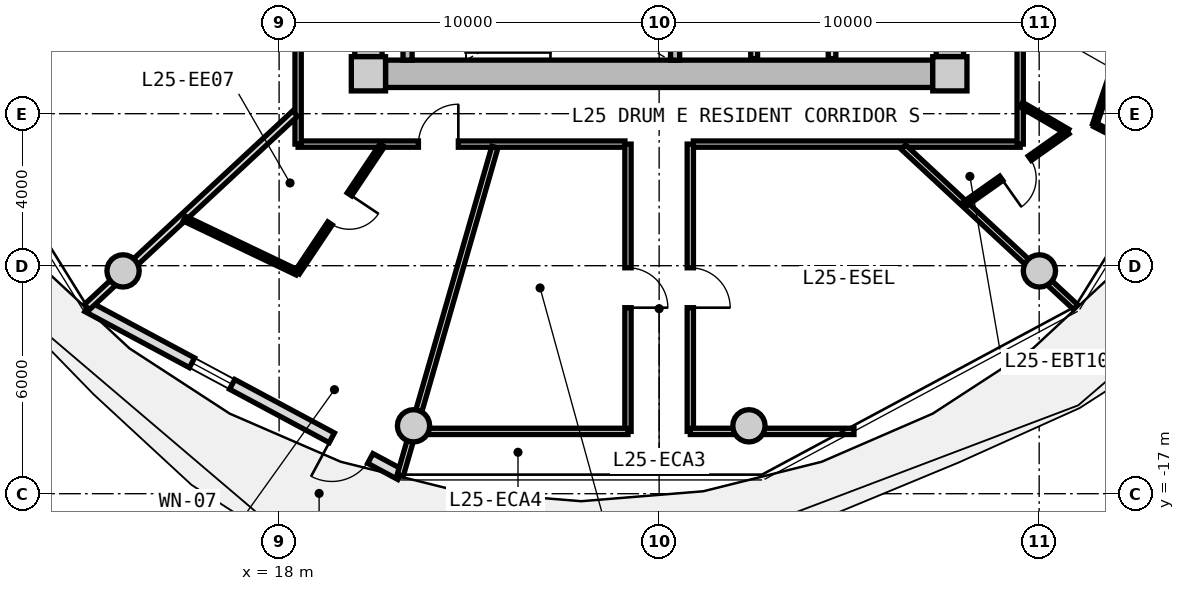
"""IFC4 building model, lengths in metres.
Left out: names, types, materials, properties, quantities, classifications, styles, units other than length and angle.
Written with IfcOpenShell. Run it as: python <this file> out.ifc"""

import sys

from ifc_helpers import new_model, si_unit, direction, frame, frame_2d, origin, origin_2d, place, context, subcontext, project, spatial, rectangle, circle, extrude, source, transform, mapped, element, fill, save


model = new_model("IFC4")
c1 = context("Model", 3, precision=1e-05, world=origin(), true_north=direction((0.0, 1.0)))
c2 = subcontext(c1, "Body", "Model", "MODEL_VIEW")
j1 = project(units=[si_unit("LENGTHUNIT", "METRE"), si_unit("PLANEANGLEUNIT", "RADIAN")], contexts=[c1])
p1 = place(None, origin())
s1 = spatial("IfcSite", under=j1, at=p1, CompositionType="ELEMENT")
p2 = place(p1, origin())
s2 = spatial("IfcBuilding", under=s1, at=p2, CompositionType="ELEMENT")
p3 = place(p2, frame((0.0, 0.0, 84.05)))
s3 = spatial("IfcBuildingStorey", under=s2, at=p3, CompositionType="ELEMENT", Elevation=84.05)
m1 = source(origin(), c2, "Body", "SweptSolid", [
    extrude(rectangle(XDim=0.9, YDim=0.9, at=origin_2d()), origin(), (0.0, 0.0, 1.0), 3.05),
])
for number, where, z_axis, x_axis in (
    (1, (20.35, -5.95, 0.0), (0.0, 0.0, 1.0), (1.0, 0.0, 0.0)),
    (2, (35.65, -5.95, 0.0), (0.0, 0.0, 1.0), (1.0, 0.0, 0.0)),
):
    element("IfcColumn", number, at=place(p3, frame(where, z_axis=z_axis, x_axis=x_axis)), inside=s3, PredefinedType="COLUMN", context=c2, shape_type="MappedRepresentation", body=[
        mapped(m1, transform((0.0, 0.0, 0.0), x_axis=(1.0, 0.0, 0.0), y_axis=(0.0, 1.0, 0.0), z_axis=(0.0, 0.0, 1.0), scale=1.0)),
    ])
m2 = source(origin(), c2, "Body", "SweptSolid", [
    extrude(rectangle(XDim=14.4, YDim=0.72, at=frame_2d((7.2, 0.0))), origin(), (0.0, 0.0, 1.0), 2.79),
])
p4 = place(p3, frame((35.2, -5.95, 0.0), z_axis=(0.0, 0.0, 1.0), x_axis=(-1.0, 0.0, 0.0)))
e3 = element("IfcWall", 3, at=p4, inside=s3, PredefinedType="SHEAR", context=c2, shape_type="MappedRepresentation", body=[
    mapped(m2, transform((0.0, 0.0, 0.0), x_axis=(1.0, 0.0, 0.0), y_axis=(0.0, 1.0, 0.0), z_axis=(0.0, 0.0, 1.0), scale=1.0)),
])
m3 = source(origin(), c2, "Body", "SweptSolid", [
    extrude(rectangle(XDim=11.0, YDim=0.72, at=frame_2d((5.5, 0.0))), origin(), (0.0, 0.0, 1.0), 2.79),
])
p5 = place(p3, frame((20.35, -5.5, 0.0), z_axis=(0.0, 0.0, 1.0), x_axis=(0.0, 1.0, 0.0)))
e4 = element("IfcWall", 4, at=p5, inside=s3, PredefinedType="SHEAR", context=c2, shape_type="MappedRepresentation", body=[
    mapped(m3, transform((0.0, 0.0, 0.0), x_axis=(1.0, 0.0, 0.0), y_axis=(0.0, 1.0, 0.0), z_axis=(0.0, 0.0, 1.0), scale=1.0)),
])
p6 = place(p5, frame((3.8, 0.0, 0.0)))
e5 = element("IfcOpeningElement", 5, at=p6, cuts=e4, PredefinedType="OPENING", context=c2, shape_type="SweptSolid", body=[
    extrude(rectangle(XDim=1.2, YDim=2.15, at=frame_2d((0.6, 1.075))), frame((0.0, 0.37, 0.0), z_axis=(0.0, -1.0, 0.0), x_axis=(1.0, 0.0, 0.0)), (0.0, 0.0, 1.0), 0.74),
])
p7 = place(p3, frame((35.65, 5.5, 0.0), z_axis=(0.0, 0.0, 1.0), x_axis=(0.0, -1.0, 0.0)))
e6 = element("IfcWall", 6, at=p7, inside=s3, PredefinedType="SHEAR", context=c2, shape_type="MappedRepresentation", body=[
    mapped(m3, transform((0.0, 0.0, 0.0), x_axis=(1.0, 0.0, 0.0), y_axis=(0.0, 1.0, 0.0), z_axis=(0.0, 0.0, 1.0), scale=1.0)),
])
p8 = place(p7, frame((5.65, 0.0, 0.0)))
e7 = element("IfcOpeningElement", 7, at=p8, cuts=e6, PredefinedType="OPENING", context=c2, shape_type="SweptSolid", body=[
    extrude(rectangle(XDim=1.2, YDim=2.15, at=frame_2d((0.6, 1.075))), frame((0.0, 0.37, 0.0), z_axis=(0.0, -1.0, 0.0), x_axis=(1.0, 0.0, 0.0)), (0.0, 0.0, 1.0), 0.74),
])
m4 = source(origin(), c2, "Body", "SweptSolid", [
    extrude(circle(Radius=0.425, at=origin_2d()), origin(), (0.0, 0.0, 1.0), 3.05),
])
for number, where, z_axis, x_axis in (
    (8, (13.894, -11.137, 0.0), (0.0, 0.0, 1.0), (1.0, 0.0, 0.0)),
    (9, (21.537, -15.213, 0.0), (0.0, 0.0, 1.0), (1.0, 0.0, 0.0)),
    (10, (30.363, -15.213, 0.0), (0.0, 0.0, 1.0), (1.0, 0.0, 0.0)),
    (11, (38.006, -11.137, 0.0), (0.0, 0.0, 1.0), (1.0, 0.0, 0.0)),
):
    element("IfcColumn", number, at=place(p3, frame(where, z_axis=z_axis, x_axis=x_axis)), inside=s3, PredefinedType="COLUMN", context=c2, shape_type="MappedRepresentation", body=[
        mapped(m4, transform((0.0, 0.0, 0.0), x_axis=(1.0, 0.0, 0.0), y_axis=(0.0, 1.0, 0.0), z_axis=(0.0, 0.0, 1.0), scale=1.0)),
    ])
m5 = source(origin(), c2, "Body", "SweptSolid", [
    extrude(rectangle(XDim=9.351, YDim=0.29, at=frame_2d((4.675, 0.0))), origin(), (0.0, 0.0, 1.0), 2.79),
])
p9 = place(p3, frame((21.193, -16.498, 0.0), z_axis=(0.0, 0.0, 1.0), x_axis=(-0.881184411073, 0.472772708267, 0.0)))
e12 = element("IfcWall", 12, at=p9, inside=s3, PredefinedType="SOLIDWALL", context=c2, shape_type="MappedRepresentation", body=[
    mapped(m5, transform((0.0, 0.0, 0.0), x_axis=(1.0, 0.0, 0.0), y_axis=(0.0, 1.0, 0.0), z_axis=(0.0, 0.0, 1.0), scale=1.0)),
])
p10 = place(p9, frame((0.9, 0.0, 0.0)))
e13 = element("IfcOpeningElement", 13, at=p10, cuts=e12, PredefinedType="OPENING", context=c2, shape_type="SweptSolid", body=[
    extrude(rectangle(XDim=1.15, YDim=2.25, at=frame_2d((0.575, 1.125))), frame((0.0, 0.155, 0.0), z_axis=(0.0, -1.0, 0.0), x_axis=(1.0, 0.0, 0.0)), (0.0, 0.0, 1.0), 0.31),
])
p11 = place(p9, frame((5.025, 0.0, 0.85)))
e14 = element("IfcOpeningElement", 14, at=p11, cuts=e12, PredefinedType="OPENING", context=c2, shape_type="SweptSolid", body=[
    extrude(rectangle(XDim=1.2, YDim=1.5, at=frame_2d((0.6, 0.75))), frame((0.0, 0.155, 0.0), z_axis=(0.0, -1.0, 0.0), x_axis=(1.0, 0.0, 0.0)), (0.0, 0.0, 1.0), 0.31),
])
m6 = source(origin(), c2, "Body", "SweptSolid", [
    extrude(rectangle(XDim=3.14, YDim=0.24, at=frame_2d((1.57, 0.0))), origin(), (0.0, 0.0, 1.0), 2.79),
])
for number, where, z_axis, x_axis in (
    (15, (21.38, -5.59, 0.0), (0.0, 0.0, 1.0), (0.0, 1.0, 0.0)),
    (16, (28.42, -5.59, 0.0), (0.0, 0.0, 1.0), (0.0, 1.0, 0.0)),
):
    element("IfcWall", number, at=place(p3, frame(where, z_axis=z_axis, x_axis=x_axis)), inside=s3, PredefinedType="PARTITIONING", context=c2, shape_type="MappedRepresentation", body=[
        mapped(m6, transform((0.0, 0.0, 0.0), x_axis=(1.0, 0.0, 0.0), y_axis=(0.0, 1.0, 0.0), z_axis=(0.0, 0.0, 1.0), scale=1.0)),
    ])
m7 = source(origin(), c2, "Body", "SweptSolid", [
    extrude(rectangle(XDim=3.8, YDim=0.2, at=frame_2d((1.9, 0.0))), origin(), (0.0, 0.0, 1.0), 2.775),
])
p12 = place(p3, frame((32.55, -5.55, 0.0), z_axis=(0.0, 0.0, 1.0), x_axis=(0.0, 1.0, 0.0)))
e17 = element("IfcWall", 17, at=p12, inside=s3, PredefinedType="PARTITIONING", context=c2, shape_type="MappedRepresentation", body=[
    mapped(m7, transform((0.0, 0.0, 0.0), x_axis=(1.0, 0.0, 0.0), y_axis=(0.0, 1.0, 0.0), z_axis=(0.0, 0.0, 1.0), scale=1.0)),
])
m8 = source(origin(), c2, "Body", "SweptSolid", [
    extrude(rectangle(XDim=3.22, YDim=0.18, at=frame_2d((1.61, 0.0))), origin(), (0.0, 0.0, 1.0), 2.775),
])
p13 = place(p3, frame((30.5, -5.55, 0.0), z_axis=(0.0, 0.0, 1.0), x_axis=(0.0, 1.0, 0.0)))
e18 = element("IfcWall", 18, at=p13, inside=s3, PredefinedType="PARTITIONING", context=c2, shape_type="MappedRepresentation", body=[
    mapped(m8, transform((0.0, 0.0, 0.0), x_axis=(1.0, 0.0, 0.0), y_axis=(0.0, 1.0, 0.0), z_axis=(0.0, 0.0, 1.0), scale=1.0)),
])
m9 = source(origin(), c2, "Body", "SweptSolid", [
    extrude(rectangle(XDim=8.6, YDim=0.165, at=frame_2d((4.3, 0.0))), origin(), (0.0, 0.0, 1.0), 2.775),
])
p14 = place(p3, frame((37.5, -7.8, 0.0), z_axis=(0.0, 0.0, 1.0), x_axis=(-1.0, 0.0, 0.0)))
e19 = element("IfcWall", 19, at=p14, inside=s3, PredefinedType="PARTITIONING", context=c2, shape_type="MappedRepresentation", body=[
    mapped(m9, transform((0.0, 0.0, 0.0), x_axis=(1.0, 0.0, 0.0), y_axis=(0.0, 1.0, 0.0), z_axis=(0.0, 0.0, 1.0), scale=1.0)),
])
p15 = place(p3, frame((27.1, -7.8, 0.0), z_axis=(0.0, 0.0, 1.0), x_axis=(-1.0, 0.0, 0.0)))
e20 = element("IfcWall", 20, at=p15, inside=s3, PredefinedType="PARTITIONING", context=c2, shape_type="MappedRepresentation", body=[
    mapped(m9, transform((0.0, 0.0, 0.0), x_axis=(1.0, 0.0, 0.0), y_axis=(0.0, 1.0, 0.0), z_axis=(0.0, 0.0, 1.0), scale=1.0)),
])
p16 = place(p15, frame((4.384, 0.0, 0.0)))
e21 = element("IfcOpeningElement", 21, at=p16, cuts=e20, PredefinedType="OPENING", context=c2, shape_type="SweptSolid", body=[
    extrude(rectangle(XDim=1.05, YDim=2.15, at=frame_2d((0.525, 1.075))), frame((0.0, 0.093, 0.0), z_axis=(0.0, -1.0, 0.0), x_axis=(1.0, 0.0, 0.0)), (0.0, 0.0, 1.0), 0.185),
])
m10 = source(origin(), c2, "Body", "SweptSolid", [
    extrude(rectangle(XDim=15.6, YDim=0.165, at=frame_2d((7.8, 0.0))), origin(), (0.0, 0.0, 1.0), 2.775),
])
p17 = place(p3, frame((18.5, -7.8, 0.0), z_axis=(0.0, 0.0, 1.0), x_axis=(0.0, 1.0, 0.0)))
e22 = element("IfcWall", 22, at=p17, inside=s3, PredefinedType="PARTITIONING", context=c2, shape_type="MappedRepresentation", body=[
    mapped(m10, transform((0.0, 0.0, 0.0), x_axis=(1.0, 0.0, 0.0), y_axis=(0.0, 1.0, 0.0), z_axis=(0.0, 0.0, 1.0), scale=1.0)),
])
p18 = place(p17, frame((7.134, 0.0, 0.0)))
e23 = element("IfcOpeningElement", 23, at=p18, cuts=e22, PredefinedType="OPENING", context=c2, shape_type="SweptSolid", body=[
    extrude(rectangle(XDim=1.25, YDim=2.2, at=frame_2d((0.625, 1.1))), frame((0.0, 0.093, 0.0), z_axis=(0.0, -1.0, 0.0), x_axis=(1.0, 0.0, 0.0)), (0.0, 0.0, 1.0), 0.185),
])
p19 = place(p3, frame((37.5, 7.8, 0.0), z_axis=(0.0, 0.0, 1.0), x_axis=(0.0, -1.0, 0.0)))
e24 = element("IfcWall", 24, at=p19, inside=s3, PredefinedType="PARTITIONING", context=c2, shape_type="MappedRepresentation", body=[
    mapped(m10, transform((0.0, 0.0, 0.0), x_axis=(1.0, 0.0, 0.0), y_axis=(0.0, 1.0, 0.0), z_axis=(0.0, 0.0, 1.0), scale=1.0)),
])
p20 = place(p19, frame((9.177, 0.0, 0.0)))
e25 = element("IfcOpeningElement", 25, at=p20, cuts=e24, PredefinedType="OPENING", context=c2, shape_type="SweptSolid", body=[
    extrude(rectangle(XDim=1.05, YDim=2.15, at=frame_2d((0.525, 1.075))), frame((0.0, 0.093, 0.0), z_axis=(0.0, -1.0, 0.0), x_axis=(1.0, 0.0, 0.0)), (0.0, 0.0, 1.0), 0.185),
])
m11 = source(origin(), c2, "Body", "SweptSolid", [
    extrude(rectangle(XDim=8.989, YDim=0.165, at=frame_2d((4.495, 0.0))), origin(), (0.0, 0.0, 1.0), 2.275),
])
p21 = place(p3, frame((23.678, -7.88, 0.0), z_axis=(0.0, 0.0, 1.0), x_axis=(-0.27702323008, -0.960863221274, 0.0)))
e26 = element("IfcWall", 26, at=p21, inside=s3, PredefinedType="PARTITIONING", context=c2, shape_type="MappedRepresentation", body=[
    mapped(m11, transform((0.0, 0.0, 0.0), x_axis=(1.0, 0.0, 0.0), y_axis=(0.0, 1.0, 0.0), z_axis=(0.0, 0.0, 1.0), scale=1.0)),
])
m12 = source(origin(), c2, "Body", "SweptSolid", [
    extrude(rectangle(XDim=6.187, YDim=0.165, at=frame_2d((3.093, 0.0))), origin(), (0.0, 0.0, 1.0), 2.275),
])
p22 = place(p3, frame((34.429, -7.88, 0.0), z_axis=(0.0, 0.0, 1.0), x_axis=(0.732501077882, -0.680765870841, 0.0)))
e27 = element("IfcWall", 27, at=p22, inside=s3, PredefinedType="PARTITIONING", context=c2, shape_type="MappedRepresentation", body=[
    mapped(m12, transform((0.0, 0.0, 0.0), x_axis=(1.0, 0.0, 0.0), y_axis=(0.0, 1.0, 0.0), z_axis=(0.0, 0.0, 1.0), scale=1.0)),
])
m13 = source(origin(), c2, "Body", "SweptSolid", [
    extrude(rectangle(XDim=7.56, YDim=0.165, at=frame_2d((3.78, 0.0))), origin(), (0.0, 0.0, 1.0), 2.775),
])
p23 = place(p3, frame((27.18, -15.36, 0.0), z_axis=(0.0, 0.0, 1.0), x_axis=(0.0, 1.0, 0.0)))
e28 = element("IfcWall", 28, at=p23, inside=s3, PredefinedType="PARTITIONING", context=c2, shape_type="MappedRepresentation", body=[
    mapped(m13, transform((0.0, 0.0, 0.0), x_axis=(1.0, 0.0, 0.0), y_axis=(0.0, 1.0, 0.0), z_axis=(0.0, 0.0, 1.0), scale=1.0)),
])
p24 = place(p23, frame((3.255, 0.0, 0.0)))
e29 = element("IfcOpeningElement", 29, at=p24, cuts=e28, PredefinedType="OPENING", context=c2, shape_type="SweptSolid", body=[
    extrude(rectangle(XDim=1.05, YDim=2.15, at=frame_2d((0.525, 1.075))), frame((0.0, 0.093, 0.0), z_axis=(0.0, -1.0, 0.0), x_axis=(1.0, 0.0, 0.0)), (0.0, 0.0, 1.0), 0.185),
])
m14 = source(origin(), c2, "Body", "SweptSolid", [
    extrude(rectangle(XDim=5.814, YDim=0.165, at=frame_2d((2.907, 0.0))), origin(), (0.0, 0.0, 1.0), 2.275),
])
p25 = place(p3, frame((21.366, -15.36, 0.0), z_axis=(0.0, 0.0, 1.0), x_axis=(1.0, 0.0, 0.0)))
e30 = element("IfcWall", 30, at=p25, inside=s3, PredefinedType="PARTITIONING", context=c2, shape_type="MappedRepresentation", body=[
    mapped(m14, transform((0.0, 0.0, 0.0), x_axis=(1.0, 0.0, 0.0), y_axis=(0.0, 1.0, 0.0), z_axis=(0.0, 0.0, 1.0), scale=1.0)),
])
p26 = place(p3, frame((28.82, -15.36, 0.0), z_axis=(0.0, 0.0, 1.0), x_axis=(0.0, 1.0, 0.0)))
e31 = element("IfcWall", 31, at=p26, inside=s3, PredefinedType="PARTITIONING", context=c2, shape_type="MappedRepresentation", body=[
    mapped(m13, transform((0.0, 0.0, 0.0), x_axis=(1.0, 0.0, 0.0), y_axis=(0.0, 1.0, 0.0), z_axis=(0.0, 0.0, 1.0), scale=1.0)),
])
p27 = place(p26, frame((3.255, 0.0, 0.0)))
e32 = element("IfcOpeningElement", 32, at=p27, cuts=e31, PredefinedType="OPENING", context=c2, shape_type="SweptSolid", body=[
    extrude(rectangle(XDim=1.05, YDim=2.15, at=frame_2d((0.525, 1.075))), frame((0.0, 0.093, 0.0), z_axis=(0.0, -1.0, 0.0), x_axis=(1.0, 0.0, 0.0)), (0.0, 0.0, 1.0), 0.185),
])
m15 = source(origin(), c2, "Body", "SweptSolid", [
    extrude(rectangle(XDim=4.307, YDim=0.165, at=frame_2d((2.153, 0.0))), origin(), (0.0, 0.0, 1.0), 2.275),
])
p28 = place(p3, frame((28.82, -15.36, 0.0), z_axis=(0.0, 0.0, 1.0), x_axis=(1.0, 0.0, 0.0)))
e33 = element("IfcWall", 33, at=p28, inside=s3, PredefinedType="PARTITIONING", context=c2, shape_type="MappedRepresentation", body=[
    mapped(m15, transform((0.0, 0.0, 0.0), x_axis=(1.0, 0.0, 0.0), y_axis=(0.0, 1.0, 0.0), z_axis=(0.0, 0.0, 1.0), scale=1.0)),
])
m16 = source(origin(), c2, "Body", "SweptSolid", [
    extrude(rectangle(XDim=7.482, YDim=0.19, at=frame_2d((3.741, 0.0))), origin(), (0.0, 0.0, 1.0), 2.275),
])
p29 = place(p3, frame((18.42, -6.998, 0.0), z_axis=(0.0, 0.0, 1.0), x_axis=(-0.732508698043, -0.680757671489, 0.0)))
e34 = element("IfcWall", 34, at=p29, inside=s3, PredefinedType="PARTITIONING", context=c2, shape_type="MappedRepresentation", body=[
    mapped(m16, transform((0.0, 0.0, 0.0), x_axis=(1.0, 0.0, 0.0), y_axis=(0.0, 1.0, 0.0), z_axis=(0.0, 0.0, 1.0), scale=1.0)),
])
m17 = source(origin(), c2, "Body", "SweptSolid", [
    extrude(rectangle(XDim=4.027, YDim=0.14, at=frame_2d((2.014, 0.0))), origin(), (0.0, 0.0, 1.0), 2.775),
])
p30 = place(p3, frame((20.714, -7.83, 0.0), z_axis=(0.0, 0.0, 1.0), x_axis=(-0.555832825922, -0.831294093343, 0.0)))
e35 = element("IfcWall", 35, at=p30, inside=s3, PredefinedType="PARTITIONING", context=c2, shape_type="MappedRepresentation", body=[
    mapped(m17, transform((0.0, 0.0, 0.0), x_axis=(1.0, 0.0, 0.0), y_axis=(0.0, 1.0, 0.0), z_axis=(0.0, 0.0, 1.0), scale=1.0)),
])
p31 = place(p30, frame((1.554, 0.0, 0.0)))
e36 = element("IfcOpeningElement", 36, at=p31, cuts=e35, PredefinedType="OPENING", context=c2, shape_type="SweptSolid", body=[
    extrude(rectangle(XDim=0.92, YDim=2.1, at=frame_2d((0.46, 1.05))), frame((0.0, 0.08, 0.0), z_axis=(0.0, -1.0, 0.0), x_axis=(1.0, 0.0, 0.0)), (0.0, 0.0, 1.0), 0.16),
])
m18 = source(origin(), c2, "Body", "SweptSolid", [
    extrude(rectangle(XDim=3.291, YDim=0.14, at=frame_2d((1.646, 0.0))), origin(), (0.0, 0.0, 1.0), 2.775),
])
p32 = place(p3, frame((18.476, -11.178, 0.0), z_axis=(0.0, 0.0, 1.0), x_axis=(-0.902381393443, 0.430938302739, 0.0)))
e37 = element("IfcWall", 37, at=p32, inside=s3, PredefinedType="PARTITIONING", context=c2, shape_type="MappedRepresentation", body=[
    mapped(m18, transform((0.0, 0.0, 0.0), x_axis=(1.0, 0.0, 0.0), y_axis=(0.0, 1.0, 0.0), z_axis=(0.0, 0.0, 1.0), scale=1.0)),
])
m19 = source(origin(), c2, "Body", "SweptSolid", [
    extrude(rectangle(XDim=1.407, YDim=0.14, at=frame_2d((0.704, 0.0))), origin(), (0.0, 0.0, 1.0), 2.775),
])
p33 = place(p3, frame((37.53, -6.762, 0.0), z_axis=(0.0, 0.0, 1.0), x_axis=(0.863539718977, -0.504280828258, 0.0)))
e38 = element("IfcWall", 38, at=p33, inside=s3, PredefinedType="PARTITIONING", context=c2, shape_type="MappedRepresentation", body=[
    mapped(m19, transform((0.0, 0.0, 0.0), x_axis=(1.0, 0.0, 0.0), y_axis=(0.0, 1.0, 0.0), z_axis=(0.0, 0.0, 1.0), scale=1.0)),
])
m20 = source(origin(), c2, "Body", "SweptSolid", [
    extrude(rectangle(XDim=3.347, YDim=0.14, at=frame_2d((1.673, 0.0))), origin(), (0.0, 0.0, 1.0), 2.775),
])
p34 = place(p3, frame((38.745, -7.472, 0.0), z_axis=(0.0, 0.0, 1.0), x_axis=(-0.81705680263, -0.576557179537, 0.0)))
e39 = element("IfcWall", 39, at=p34, inside=s3, PredefinedType="PARTITIONING", context=c2, shape_type="MappedRepresentation", body=[
    mapped(m20, transform((0.0, 0.0, 0.0), x_axis=(1.0, 0.0, 0.0), y_axis=(0.0, 1.0, 0.0), z_axis=(0.0, 0.0, 1.0), scale=1.0)),
])
p35 = place(p34, frame((1.214, 0.0, 0.0)))
e40 = element("IfcOpeningElement", 40, at=p35, cuts=e39, PredefinedType="OPENING", context=c2, shape_type="SweptSolid", body=[
    extrude(rectangle(XDim=0.92, YDim=2.1, at=frame_2d((0.46, 1.05))), frame((0.0, 0.08, 0.0), z_axis=(0.0, -1.0, 0.0), x_axis=(1.0, 0.0, 0.0)), (0.0, 0.0, 1.0), 0.16),
])
m21 = source(origin(), c2, "Body", "SweptSolid", [
    extrude(rectangle(XDim=2.117, YDim=0.115, at=frame_2d((1.059, 0.0))), origin(), (0.0, 0.0, 1.0), 2.775),
])
p36 = place(p3, frame((39.46, -7.289, 0.0), z_axis=(0.0, 0.0, 1.0), x_axis=(0.888941834945, -0.45802010227, 0.0)))
e41 = element("IfcWall", 41, at=p36, inside=s3, PredefinedType="PARTITIONING", context=c2, shape_type="MappedRepresentation", body=[
    mapped(m21, transform((0.0, 0.0, 0.0), x_axis=(1.0, 0.0, 0.0), y_axis=(0.0, 1.0, 0.0), z_axis=(0.0, 0.0, 1.0), scale=1.0)),
])
m22 = source(origin(), c2, "Body", "SweptSolid", [
    extrude(rectangle(XDim=3.801, YDim=0.115, at=frame_2d((1.901, 0.0))), origin(), (0.0, 0.0, 1.0), 2.775),
])
p37 = place(p3, frame((39.46, -7.289, 0.0), z_axis=(0.0, 0.0, 1.0), x_axis=(0.320097904666, 0.947384468644, 0.0)))
e42 = element("IfcWall", 42, at=p37, inside=s3, PredefinedType="PARTITIONING", context=c2, shape_type="MappedRepresentation", body=[
    mapped(m22, transform((0.0, 0.0, 0.0), x_axis=(1.0, 0.0, 0.0), y_axis=(0.0, 1.0, 0.0), z_axis=(0.0, 0.0, 1.0), scale=1.0)),
])
p38 = place(p37, frame((1.426, 0.0, 0.0)))
e43 = element("IfcOpeningElement", 43, at=p38, cuts=e42, PredefinedType="OPENING", context=c2, shape_type="SweptSolid", body=[
    extrude(rectangle(XDim=0.95, YDim=2.1, at=frame_2d((0.475, 1.05))), frame((0.0, 0.067, 0.0), z_axis=(0.0, -1.0, 0.0), x_axis=(1.0, 0.0, 0.0)), (0.0, 0.0, 1.0), 0.135),
])
m23 = source(origin(), c2, "Body", "SweptSolid", [
    extrude(rectangle(XDim=1.15, YDim=2.25, at=frame_2d((0.575, 1.125))), frame((0.0, 0.025, 0.0), z_axis=(0.0, -1.0, 0.0), x_axis=(1.0, 0.0, 0.0)), (0.0, 0.0, 1.0), 0.05),
])
p39 = place(p10, origin())
e44 = element("IfcDoor", 44, at=p39, inside=s3, OperationType="SINGLE_SWING_RIGHT", PredefinedType="DOOR", context=c2, shape_type="MappedRepresentation", body=[
    mapped(m23, transform((0.0, 0.0, 0.0), x_axis=(1.0, 0.0, 0.0), y_axis=(0.0, 1.0, 0.0), z_axis=(0.0, 0.0, 1.0), scale=1.0)),
])
fill(e13, e44)
m24 = source(origin(), c2, "Body", "SweptSolid", [
    extrude(rectangle(XDim=1.2, YDim=1.5, at=frame_2d((0.6, 0.75))), frame((0.0, 0.03, 0.0), z_axis=(0.0, -1.0, 0.0), x_axis=(1.0, 0.0, 0.0)), (0.0, 0.0, 1.0), 0.06),
])
p40 = place(p11, origin())
e45 = element("IfcWindow", 45, at=p40, inside=s3, PartitioningType="SINGLE_PANEL", PredefinedType="WINDOW", context=c2, shape_type="MappedRepresentation", body=[
    mapped(m24, transform((0.0, 0.0, 0.0), x_axis=(1.0, 0.0, 0.0), y_axis=(0.0, 1.0, 0.0), z_axis=(0.0, 0.0, 1.0), scale=1.0)),
])
fill(e14, e45)
m25 = source(origin(), c2, "Body", "SweptSolid", [
    extrude(rectangle(XDim=1.05, YDim=2.15, at=frame_2d((0.525, 1.075))), frame((0.0, 0.025, 0.0), z_axis=(0.0, -1.0, 0.0), x_axis=(1.0, 0.0, 0.0)), (0.0, 0.0, 1.0), 0.05),
])
p41 = place(p24, frame((1.05, 0.0, 0.0), z_axis=(0.0, 0.0, 1.0), x_axis=(-1.0, 0.0, 0.0)))
e46 = element("IfcDoor", 46, at=p41, inside=s3, OperationType="SINGLE_SWING_RIGHT", PredefinedType="DOOR", context=c2, shape_type="MappedRepresentation", body=[
    mapped(m25, transform((0.0, 0.0, 0.0), x_axis=(1.0, 0.0, 0.0), y_axis=(0.0, 1.0, 0.0), z_axis=(0.0, 0.0, 1.0), scale=1.0)),
])
fill(e29, e46)
p42 = place(p27, frame((1.05, 0.0, 0.0), z_axis=(0.0, 0.0, 1.0), x_axis=(-1.0, 0.0, 0.0)))
e47 = element("IfcDoor", 47, at=p42, inside=s3, OperationType="SINGLE_SWING_RIGHT", PredefinedType="DOOR", context=c2, shape_type="MappedRepresentation", body=[
    mapped(m25, transform((0.0, 0.0, 0.0), x_axis=(1.0, 0.0, 0.0), y_axis=(0.0, 1.0, 0.0), z_axis=(0.0, 0.0, 1.0), scale=1.0)),
])
fill(e32, e47)
p43 = place(p16, frame((1.05, 0.0, 0.0), z_axis=(0.0, 0.0, 1.0), x_axis=(-1.0, 0.0, 0.0)))
e48 = element("IfcDoor", 48, at=p43, inside=s3, OperationType="SINGLE_SWING_RIGHT", PredefinedType="DOOR", context=c2, shape_type="MappedRepresentation", body=[
    mapped(m25, transform((0.0, 0.0, 0.0), x_axis=(1.0, 0.0, 0.0), y_axis=(0.0, 1.0, 0.0), z_axis=(0.0, 0.0, 1.0), scale=1.0)),
])
fill(e21, e48)
m26 = source(origin(), c2, "Body", "SweptSolid", [
    extrude(rectangle(XDim=0.92, YDim=2.1, at=frame_2d((0.46, 1.05))), frame((0.0, 0.025, 0.0), z_axis=(0.0, -1.0, 0.0), x_axis=(1.0, 0.0, 0.0)), (0.0, 0.0, 1.0), 0.05),
])
p44 = place(p31, origin())
e49 = element("IfcDoor", 49, at=p44, inside=s3, OperationType="SINGLE_SWING_LEFT", PredefinedType="DOOR", context=c2, shape_type="MappedRepresentation", body=[
    mapped(m26, transform((0.0, 0.0, 0.0), x_axis=(1.0, 0.0, 0.0), y_axis=(0.0, 1.0, 0.0), z_axis=(0.0, 0.0, 1.0), scale=1.0)),
])
fill(e36, e49)
p45 = place(p35, origin())
e50 = element("IfcDoor", 50, at=p45, inside=s3, OperationType="SINGLE_SWING_RIGHT", PredefinedType="DOOR", context=c2, shape_type="MappedRepresentation", body=[
    mapped(m26, transform((0.0, 0.0, 0.0), x_axis=(1.0, 0.0, 0.0), y_axis=(0.0, 1.0, 0.0), z_axis=(0.0, 0.0, 1.0), scale=1.0)),
])
fill(e40, e50)
save(model, sys.argv[1])
